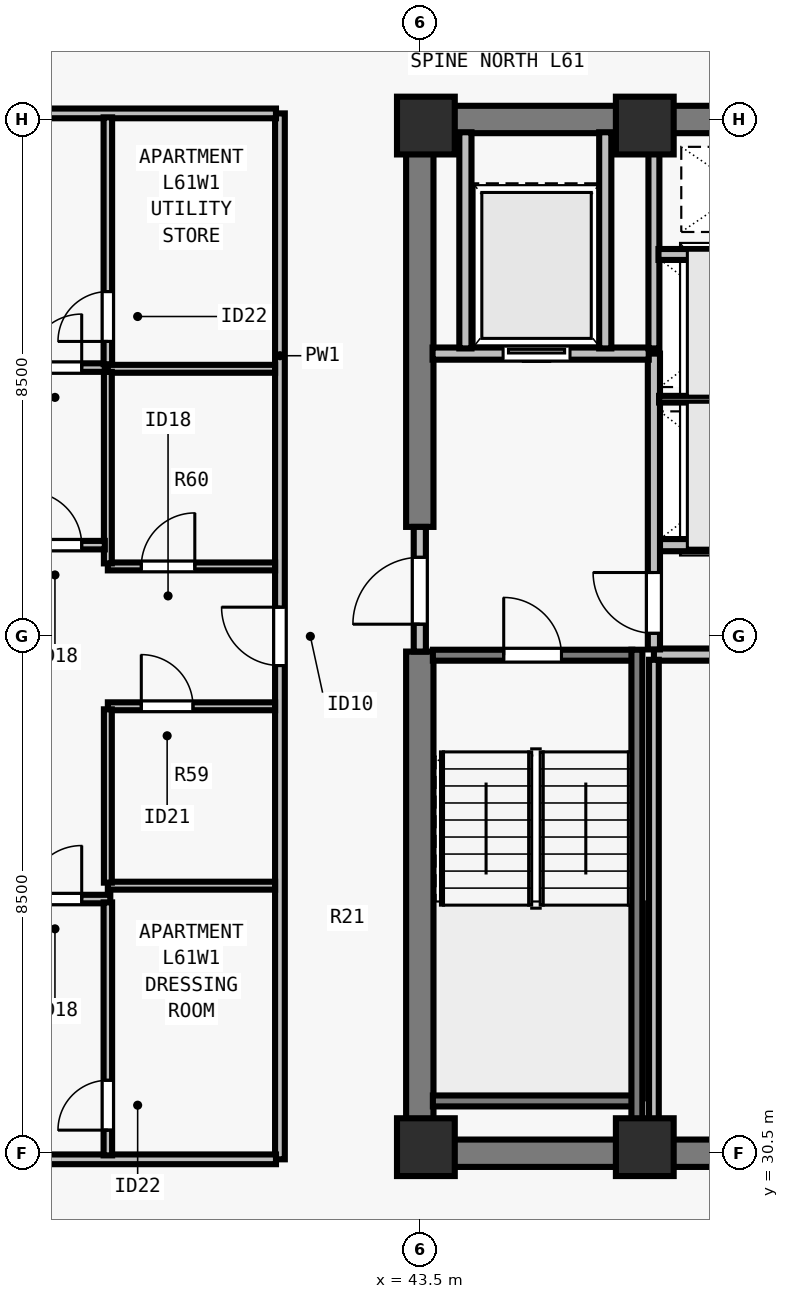
"""IFC4 building model, lengths in metres.
Left out: names, types, materials, properties, quantities, classifications, styles, units other than length and angle.
Written with IfcOpenShell. Run it as: python <this file> out.ifc"""

import sys

from ifc_helpers import new_model, si_unit, direction, frame, frame_2d, origin, origin_2d, place, context, subcontext, project, spatial, rectangle, extrude, element, fill, save


model = new_model("IFC4")
c1 = context("Model", 3, precision=1e-05, world=origin(), true_north=direction((0.0, 1.0)))
c2 = subcontext(c1, "Body", "Model", "MODEL_VIEW")
j1 = project(units=[si_unit("LENGTHUNIT", "METRE"), si_unit("PLANEANGLEUNIT", "RADIAN")], contexts=[c1])
p1 = place(None, origin())
s1 = spatial("IfcSite", under=j1, at=p1, CompositionType="ELEMENT")
p2 = place(p1, origin())
s2 = spatial("IfcBuilding", under=s1, at=p2, CompositionType="ELEMENT")
p3 = place(p2, frame((0.0, 0.0, 223.5)))
s3 = spatial("IfcBuildingStorey", under=s2, at=p3, CompositionType="ELEMENT", Elevation=223.5)
for number, where, z_axis, x_axis in (
    (1, (43.6, 30.6, 0.0), (0.0, 0.0, 1.0), (1.0, 0.0, 0.0)),
    (2, (47.2, 30.6, 0.0), (0.0, 0.0, 1.0), (1.0, 0.0, 0.0)),
    (3, (43.6, 47.4, 0.0), (0.0, 0.0, 1.0), (1.0, 0.0, 0.0)),
    (4, (47.2, 47.4, 0.0), (0.0, 0.0, 1.0), (1.0, 0.0, 0.0)),
):
    element("IfcColumn", number, at=place(p3, frame(where, z_axis=z_axis, x_axis=x_axis)), inside=s3, PredefinedType="COLUMN", context=c2, shape_type="SweptSolid", body=[
        extrude(rectangle(XDim=0.95, YDim=0.95, at=origin_2d()), origin(), (0.0, 0.0, 1.0), 3.5),
    ])
for number, where, z_axis, x_axis in (
    (5, (43.275, 30.5, 0.0), (0.0, 0.0, 1.0), (1.0, 0.0, 0.0)),
    (6, (43.275, 47.5, 0.0), (0.0, 0.0, 1.0), (1.0, 0.0, 0.0)),
):
    element("IfcWall", number, at=place(p3, frame(where, z_axis=z_axis, x_axis=x_axis)), inside=s3, PredefinedType="SHEAR", context=c2, shape_type="SweptSolid", body=[
        extrude(rectangle(XDim=17.45, YDim=0.45, at=frame_2d((8.725, 0.0))), origin(), (0.0, 0.0, 1.0), 3.29),
    ])
p4 = place(p3, frame((43.5, 30.715, 0.0), z_axis=(0.0, 0.0, 1.0), x_axis=(0.0, 1.0, 0.0)))
e7 = element("IfcWall", 7, at=p4, inside=s3, PredefinedType="SHEAR", context=c2, shape_type="SweptSolid", body=[
    extrude(rectangle(XDim=8.035, YDim=0.45, at=frame_2d((4.018, 0.0))), origin(), (0.0, 0.0, 1.0), 3.29),
])
p5 = place(p3, frame((43.5, 40.8, 0.0), z_axis=(0.0, 0.0, 1.0), x_axis=(0.0, 1.0, 0.0)))
e8 = element("IfcWall", 8, at=p5, inside=s3, PredefinedType="SHEAR", context=c2, shape_type="SweptSolid", body=[
    extrude(rectangle(XDim=6.485, YDim=0.45, at=frame_2d((3.242, 0.0))), origin(), (0.0, 0.0, 1.0), 3.29),
])
for number, where, z_axis, x_axis in (
    (9, (47.35, 38.7, 0.0), (0.0, 0.0, 1.0), (1.0, 0.0, 0.0)),
    (10, (47.35, 40.5, 0.0), (0.0, 0.0, 1.0), (1.0, 0.0, 0.0)),
):
    element("IfcWall", number, at=place(p3, frame(where, z_axis=z_axis, x_axis=x_axis)), inside=s3, PredefinedType="SOLIDWALL", context=c2, shape_type="SweptSolid", body=[
        extrude(rectangle(XDim=2.95, YDim=0.2, at=frame_2d((1.475, 0.0))), origin(), (0.0, 0.0, 1.0), 3.29),
    ])
p6 = place(p3, frame((43.5, 38.75, 0.0), z_axis=(0.0, 0.0, 1.0), x_axis=(0.0, 1.0, 0.0)))
e11 = element("IfcWall", 11, at=p6, inside=s3, PredefinedType="SOLIDWALL", context=c2, shape_type="SweptSolid", body=[
    extrude(rectangle(XDim=2.05, YDim=0.2, at=frame_2d((1.025, 0.0))), origin(), (0.0, 0.0, 1.0), 3.29),
])
p7 = place(p6, frame((0.45, 0.0, 0.0)))
e12 = element("IfcOpeningElement", 12, at=p7, cuts=e11, PredefinedType="OPENING", context=c2, shape_type="SweptSolid", body=[
    extrude(rectangle(XDim=1.1, YDim=2.15, at=frame_2d((0.55, 1.075))), frame((0.0, 0.11, 0.0), z_axis=(0.0, -1.0, 0.0), x_axis=(1.0, 0.0, 0.0)), (0.0, 0.0, 1.0), 0.22),
])
p8 = place(p3, frame((47.35, 38.785, 0.0), z_axis=(0.0, 0.0, 1.0), x_axis=(0.0, 1.0, 0.0)))
e13 = element("IfcWall", 13, at=p8, inside=s3, PredefinedType="SOLIDWALL", context=c2, shape_type="SweptSolid", body=[
    extrude(rectangle(XDim=4.865, YDim=0.2, at=frame_2d((2.433, 0.0))), origin(), (0.0, 0.0, 1.0), 3.29),
])
p9 = place(p8, frame((0.265, 0.0, 0.0)))
e14 = element("IfcOpeningElement", 14, at=p9, cuts=e13, PredefinedType="OPENING", context=c2, shape_type="SweptSolid", body=[
    extrude(rectangle(XDim=1.0, YDim=2.15, at=frame_2d((0.5, 1.075))), frame((0.0, 0.11, 0.0), z_axis=(0.0, -1.0, 0.0), x_axis=(1.0, 0.0, 0.0)), (0.0, 0.0, 1.0), 0.22),
])
p10 = place(p3, frame((43.71, 43.65, 0.0), z_axis=(0.0, 0.0, 1.0), x_axis=(1.0, 0.0, 0.0)))
e15 = element("IfcWall", 15, at=p10, inside=s3, PredefinedType="SOLIDWALL", context=c2, shape_type="SweptSolid", body=[
    extrude(rectangle(XDim=3.555, YDim=0.2, at=frame_2d((1.777, 0.0))), origin(), (0.0, 0.0, 1.0), 3.29),
])
p11 = place(p10, frame((1.16, 0.0, 0.0)))
e16 = element("IfcOpeningElement", 16, at=p11, cuts=e15, PredefinedType="OPENING", context=c2, shape_type="SweptSolid", body=[
    extrude(rectangle(XDim=1.1, YDim=2.2, at=frame_2d((0.55, 1.1))), frame((0.0, 0.11, 0.0), z_axis=(0.0, -1.0, 0.0), x_axis=(1.0, 0.0, 0.0)), (0.0, 0.0, 1.0), 0.22),
])
for number, where, z_axis, x_axis in (
    (17, (46.55, 43.735, 0.0), (0.0, 0.0, 1.0), (0.0, 1.0, 0.0)),
    (18, (44.25, 43.735, 0.0), (0.0, 0.0, 1.0), (0.0, 1.0, 0.0)),
):
    element("IfcWall", number, at=place(p3, frame(where, z_axis=z_axis, x_axis=x_axis)), inside=s3, PredefinedType="SOLIDWALL", context=c2, shape_type="SweptSolid", body=[
        extrude(rectangle(XDim=3.555, YDim=0.2, at=frame_2d((1.777, 0.0))), origin(), (0.0, 0.0, 1.0), 3.29),
    ])
p12 = place(p3, frame((47.35, 30.71, 0.0), z_axis=(0.0, 0.0, 1.0), x_axis=(0.0, 1.0, 0.0)))
e19 = element("IfcWall", 19, at=p12, inside=s3, PredefinedType="PARTITIONING", context=c2, shape_type="SweptSolid", body=[
    extrude(rectangle(XDim=7.905, YDim=0.16, at=frame_2d((3.953, 0.0))), origin(), (0.0, 0.0, 1.0), 3.29),
])
p13 = place(p3, frame((47.35, 43.735, 0.0), z_axis=(0.0, 0.0, 1.0), x_axis=(0.0, 1.0, 0.0)))
e20 = element("IfcWall", 20, at=p13, inside=s3, PredefinedType="SOLIDWALL", context=c2, shape_type="SweptSolid", body=[
    extrude(rectangle(XDim=3.555, YDim=0.18, at=frame_2d((1.777, 0.0))), origin(), (0.0, 0.0, 1.0), 3.29),
])
p14 = place(p3, frame((47.435, 42.9, 0.0), z_axis=(0.0, 0.0, 1.0), x_axis=(1.0, 0.0, 0.0)))
e21 = element("IfcWall", 21, at=p14, inside=s3, PredefinedType="PARTITIONING", context=c2, shape_type="SweptSolid", body=[
    extrude(rectangle(XDim=2.78, YDim=0.11, at=frame_2d((1.39, 0.0))), origin(), (0.0, 0.0, 1.0), 3.29),
])
p15 = place(p3, frame((47.425, 45.28, 0.0), z_axis=(0.0, 0.0, 1.0), x_axis=(1.0, 0.0, 0.0)))
e22 = element("IfcWall", 22, at=p15, inside=s3, PredefinedType="SOLIDWALL", context=c2, shape_type="SweptSolid", body=[
    extrude(rectangle(XDim=2.79, YDim=0.18, at=frame_2d((1.395, 0.0))), origin(), (0.0, 0.0, 1.0), 3.29),
])
p16 = place(p3, frame((41.2, 30.4, 0.0), z_axis=(0.0, 0.0, 1.0), x_axis=(0.0, 1.0, 0.0)))
e23 = element("IfcWall", 23, at=p16, inside=s3, PredefinedType="PARTITIONING", context=c2, shape_type="SweptSolid", body=[
    extrude(rectangle(XDim=17.2, YDim=0.16, at=frame_2d((8.6, 0.0))), origin(), (0.0, 0.0, 1.0), 3.29),
])
p17 = place(p16, frame((8.12, 0.0, 0.0)))
e24 = element("IfcOpeningElement", 24, at=p17, cuts=e23, PredefinedType="OPENING", context=c2, shape_type="SweptSolid", body=[
    extrude(rectangle(XDim=0.96, YDim=2.18, at=frame_2d((0.48, 1.09))), frame((0.0, 0.09, 0.0), z_axis=(0.0, -1.0, 0.0), x_axis=(1.0, 0.0, 0.0)), (0.0, 0.0, 1.0), 0.18),
])
for number, where, z_axis, x_axis in (
    (25, (29.805, 30.4, 0.0), (0.0, 0.0, 1.0), (1.0, 0.0, 0.0)),
    (26, (29.805, 47.6, 0.0), (0.0, 0.0, 1.0), (1.0, 0.0, 0.0)),
):
    element("IfcWall", number, at=place(p3, frame(where, z_axis=z_axis, x_axis=x_axis)), inside=s3, PredefinedType="PARTITIONING", context=c2, shape_type="SweptSolid", body=[
        extrude(rectangle(XDim=11.33, YDim=0.16, at=frame_2d((5.665, 0.0))), origin(), (0.0, 0.0, 1.0), 3.29),
    ])
p18 = place(p3, frame((38.37, 34.9, 0.0), z_axis=(0.0, 0.0, 1.0), x_axis=(1.0, 0.0, 0.0)))
e27 = element("IfcWall", 27, at=p18, inside=s3, PredefinedType="PLUMBINGWALL", context=c2, shape_type="SweptSolid", body=[
    extrude(rectangle(XDim=2.75, YDim=0.13, at=frame_2d((1.375, 0.0))), origin(), (0.0, 0.0, 1.0), 3.29),
])
p19 = place(p3, frame((38.37, 37.85, 0.0), z_axis=(0.0, 0.0, 1.0), x_axis=(1.0, 0.0, 0.0)))
e28 = element("IfcWall", 28, at=p19, inside=s3, PredefinedType="PLUMBINGWALL", context=c2, shape_type="SweptSolid", body=[
    extrude(rectangle(XDim=2.75, YDim=0.13, at=frame_2d((1.375, 0.0))), origin(), (0.0, 0.0, 1.0), 3.29),
])
p20 = place(p19, frame((0.55, 0.0, 0.0)))
e29 = element("IfcOpeningElement", 29, at=p20, cuts=e28, PredefinedType="OPENING", context=c2, shape_type="SweptSolid", body=[
    extrude(rectangle(XDim=0.85, YDim=2.08, at=frame_2d((0.425, 1.04))), frame((0.0, 0.075, 0.0), z_axis=(0.0, -1.0, 0.0), x_axis=(1.0, 0.0, 0.0)), (0.0, 0.0, 1.0), 0.15),
])
p21 = place(p3, frame((38.37, 34.95, 0.0), z_axis=(0.0, 0.0, 1.0), x_axis=(0.0, 1.0, 0.0)))
e30 = element("IfcWall", 30, at=p21, inside=s3, PredefinedType="PLUMBINGWALL", context=c2, shape_type="SweptSolid", body=[
    extrude(rectangle(XDim=2.85, YDim=0.13, at=frame_2d((1.425, 0.0))), origin(), (0.0, 0.0, 1.0), 3.29),
])
p22 = place(p3, frame((38.37, 43.4, 0.0), z_axis=(0.0, 0.0, 1.0), x_axis=(1.0, 0.0, 0.0)))
e31 = element("IfcWall", 31, at=p22, inside=s3, PredefinedType="PLUMBINGWALL", context=c2, shape_type="SweptSolid", body=[
    extrude(rectangle(XDim=2.75, YDim=0.13, at=frame_2d((1.375, 0.0))), origin(), (0.0, 0.0, 1.0), 2.958),
])
p23 = place(p3, frame((38.37, 40.15, 0.0), z_axis=(0.0, 0.0, 1.0), x_axis=(1.0, 0.0, 0.0)))
e32 = element("IfcWall", 32, at=p23, inside=s3, PredefinedType="PLUMBINGWALL", context=c2, shape_type="SweptSolid", body=[
    extrude(rectangle(XDim=2.75, YDim=0.13, at=frame_2d((1.375, 0.0))), origin(), (0.0, 0.0, 1.0), 3.29),
])
p24 = place(p23, frame((0.55, 0.0, 0.0)))
e33 = element("IfcOpeningElement", 33, at=p24, cuts=e32, PredefinedType="OPENING", context=c2, shape_type="SweptSolid", body=[
    extrude(rectangle(XDim=0.88, YDim=2.1, at=frame_2d((0.44, 1.05))), frame((0.0, 0.075, 0.0), z_axis=(0.0, -1.0, 0.0), x_axis=(1.0, 0.0, 0.0)), (0.0, 0.0, 1.0), 0.15),
])
p25 = place(p3, frame((38.37, 40.2, 0.0), z_axis=(0.0, 0.0, 1.0), x_axis=(0.0, 1.0, 0.0)))
e34 = element("IfcWall", 34, at=p25, inside=s3, PredefinedType="PLUMBINGWALL", context=c2, shape_type="SweptSolid", body=[
    extrude(rectangle(XDim=3.15, YDim=0.13, at=frame_2d((1.575, 0.0))), origin(), (0.0, 0.0, 1.0), 3.29),
])
p26 = place(p3, frame((29.88, 34.68, 0.0), z_axis=(0.0, 0.0, 1.0), x_axis=(1.0, 0.0, 0.0)))
e35 = element("IfcWall", 35, at=p26, inside=s3, PredefinedType="PARTITIONING", context=c2, shape_type="SweptSolid", body=[
    extrude(rectangle(XDim=8.53, YDim=0.14, at=frame_2d((4.265, 0.0))), origin(), (0.0, 0.0, 1.0), 2.958),
])
p27 = place(p26, frame((7.18, 0.0, 0.0)))
e36 = element("IfcOpeningElement", 36, at=p27, cuts=e35, PredefinedType="OPENING", context=c2, shape_type="SweptSolid", body=[
    extrude(rectangle(XDim=0.88, YDim=2.1, at=frame_2d((0.44, 1.05))), frame((0.0, 0.08, 0.0), z_axis=(0.0, -1.0, 0.0), x_axis=(1.0, 0.0, 0.0)), (0.0, 0.0, 1.0), 0.16),
])
p28 = place(p3, frame((38.37, 30.465, 0.0), z_axis=(0.0, 0.0, 1.0), x_axis=(0.0, 1.0, 0.0)))
e37 = element("IfcWall", 37, at=p28, inside=s3, PredefinedType="PARTITIONING", context=c2, shape_type="SweptSolid", body=[
    extrude(rectangle(XDim=4.16, YDim=0.14, at=frame_2d((2.08, 0.0))), origin(), (0.0, 0.0, 1.0), 3.29),
])
p29 = place(p28, frame((0.415, 0.0, 0.0)))
e38 = element("IfcOpeningElement", 38, at=p29, cuts=e37, PredefinedType="OPENING", context=c2, shape_type="SweptSolid", body=[
    extrude(rectangle(XDim=0.82, YDim=2.1, at=frame_2d((0.41, 1.05))), frame((0.0, 0.08, 0.0), z_axis=(0.0, -1.0, 0.0), x_axis=(1.0, 0.0, 0.0)), (0.0, 0.0, 1.0), 0.16),
])
p30 = place(p3, frame((29.88, 43.42, 0.0), z_axis=(0.0, 0.0, 1.0), x_axis=(1.0, 0.0, 0.0)))
e39 = element("IfcWall", 39, at=p30, inside=s3, PredefinedType="PARTITIONING", context=c2, shape_type="SweptSolid", body=[
    extrude(rectangle(XDim=8.44, YDim=0.14, at=frame_2d((4.22, 0.0))), origin(), (0.0, 0.0, 1.0), 3.29),
])
p31 = place(p30, frame((7.18, 0.0, 0.0)))
e40 = element("IfcOpeningElement", 40, at=p31, cuts=e39, PredefinedType="OPENING", context=c2, shape_type="SweptSolid", body=[
    extrude(rectangle(XDim=0.88, YDim=2.1, at=frame_2d((0.44, 1.05))), frame((0.0, 0.08, 0.0), z_axis=(0.0, -1.0, 0.0), x_axis=(1.0, 0.0, 0.0)), (0.0, 0.0, 1.0), 0.16),
])
p32 = place(p3, frame((38.37, 43.475, 0.0), z_axis=(0.0, 0.0, 1.0), x_axis=(0.0, 1.0, 0.0)))
e41 = element("IfcWall", 41, at=p32, inside=s3, PredefinedType="PARTITIONING", context=c2, shape_type="SweptSolid", body=[
    extrude(rectangle(XDim=4.06, YDim=0.14, at=frame_2d((2.03, 0.0))), origin(), (0.0, 0.0, 1.0), 3.29),
])
p33 = place(p32, frame((0.375, 0.0, 0.0)))
e42 = element("IfcOpeningElement", 42, at=p33, cuts=e41, PredefinedType="OPENING", context=c2, shape_type="SweptSolid", body=[
    extrude(rectangle(XDim=0.82, YDim=2.1, at=frame_2d((0.41, 1.05))), frame((0.0, 0.08, 0.0), z_axis=(0.0, -1.0, 0.0), x_axis=(1.0, 0.0, 0.0)), (0.0, 0.0, 1.0), 0.16),
])
p34 = place(p3, frame((29.88, 40.5, 0.0), z_axis=(0.0, 0.0, 1.0), x_axis=(1.0, 0.0, 0.0)))
e43 = element("IfcWall", 43, at=p34, inside=s3, PredefinedType="PARTITIONING", context=c2, shape_type="SweptSolid", body=[
    extrude(rectangle(XDim=8.44, YDim=0.14, at=frame_2d((4.22, 0.0))), origin(), (0.0, 0.0, 1.0), 2.958),
])
p35 = place(p34, frame((7.18, 0.0, 0.0)))
e44 = element("IfcOpeningElement", 44, at=p35, cuts=e43, PredefinedType="OPENING", context=c2, shape_type="SweptSolid", body=[
    extrude(rectangle(XDim=0.88, YDim=2.1, at=frame_2d((0.44, 1.05))), frame((0.0, 0.08, 0.0), z_axis=(0.0, -1.0, 0.0), x_axis=(1.0, 0.0, 0.0)), (0.0, 0.0, 1.0), 0.16),
])
p36 = place(p3, frame((43.715, 38.69, 0.0), z_axis=(0.0, 0.0, 1.0), x_axis=(1.0, 0.0, 0.0)))
e45 = element("IfcWall", 45, at=p36, inside=s3, PredefinedType="SOLIDWALL", context=c2, shape_type="SweptSolid", body=[
    extrude(rectangle(XDim=3.28, YDim=0.18, at=frame_2d((1.64, 0.0))), origin(), (0.0, 0.0, 1.0), 3.29),
])
p37 = place(p36, frame((1.165, 0.0, 0.0)))
e46 = element("IfcOpeningElement", 46, at=p37, cuts=e45, PredefinedType="OPENING", context=c2, shape_type="SweptSolid", body=[
    extrude(rectangle(XDim=0.95, YDim=2.15, at=frame_2d((0.475, 1.075))), frame((0.0, 0.1, 0.0), z_axis=(0.0, -1.0, 0.0), x_axis=(1.0, 0.0, 0.0)), (0.0, 0.0, 1.0), 0.2),
])
p38 = place(p3, frame((43.715, 31.36, 0.0), z_axis=(0.0, 0.0, 1.0), x_axis=(1.0, 0.0, 0.0)))
e47 = element("IfcWall", 47, at=p38, inside=s3, PredefinedType="SOLIDWALL", context=c2, shape_type="SweptSolid", body=[
    extrude(rectangle(XDim=3.28, YDim=0.18, at=frame_2d((1.64, 0.0))), origin(), (0.0, 0.0, 1.0), 3.29),
])
p39 = place(p3, frame((47.07, 38.78, 0.0), z_axis=(0.0, 0.0, 1.0), x_axis=(0.0, -1.0, 0.0)))
e48 = element("IfcWall", 48, at=p39, inside=s3, PredefinedType="SOLIDWALL", context=c2, shape_type="SweptSolid", body=[
    extrude(rectangle(XDim=8.067, YDim=0.18, at=frame_2d((4.034, 0.0))), origin(), (0.0, 0.0, 1.0), 3.29),
])
p40 = place(p7, origin())
e49 = element("IfcDoor", 49, at=p40, inside=s3, OperationType="SINGLE_SWING_LEFT", PredefinedType="DOOR", context=c2, shape_type="SweptSolid", body=[
    extrude(rectangle(XDim=1.1, YDim=2.15, at=frame_2d((0.55, 1.075))), frame((0.0, 0.025, 0.0), z_axis=(0.0, -1.0, 0.0), x_axis=(1.0, 0.0, 0.0)), (0.0, 0.0, 1.0), 0.05),
])
fill(e12, e49)
p41 = place(p9, origin())
e50 = element("IfcDoor", 50, at=p41, inside=s3, OperationType="SINGLE_SWING_RIGHT", PredefinedType="DOOR", context=c2, shape_type="SweptSolid", body=[
    extrude(rectangle(XDim=1.0, YDim=2.15, at=frame_2d((0.5, 1.075))), frame((0.0, 0.025, 0.0), z_axis=(0.0, -1.0, 0.0), x_axis=(1.0, 0.0, 0.0)), (0.0, 0.0, 1.0), 0.05),
])
fill(e14, e50)
p42 = place(p11, origin())
e51 = element("IfcDoor", 51, at=p42, inside=s3, OperationType="SLIDING_TO_LEFT", PredefinedType="DOOR", context=c2, shape_type="SweptSolid", body=[
    extrude(rectangle(XDim=1.1, YDim=2.2, at=frame_2d((0.55, 1.1))), frame((0.0, 0.025, 0.0), z_axis=(0.0, -1.0, 0.0), x_axis=(1.0, 0.0, 0.0)), (0.0, 0.0, 1.0), 0.05),
])
fill(e16, e51)
p43 = place(p20, origin())
e52 = element("IfcDoor", 52, at=p43, inside=s3, OperationType="SINGLE_SWING_LEFT", PredefinedType="DOOR", context=c2, shape_type="SweptSolid", body=[
    extrude(rectangle(XDim=0.85, YDim=2.08, at=frame_2d((0.425, 1.04))), frame((0.0, 0.025, 0.0), z_axis=(0.0, -1.0, 0.0), x_axis=(1.0, 0.0, 0.0)), (0.0, 0.0, 1.0), 0.05),
])
fill(e29, e52)
p44 = place(p24, origin())
e53 = element("IfcDoor", 53, at=p44, inside=s3, OperationType="SINGLE_SWING_RIGHT", PredefinedType="DOOR", context=c2, shape_type="SweptSolid", body=[
    extrude(rectangle(XDim=0.88, YDim=2.1, at=frame_2d((0.44, 1.05))), frame((0.0, 0.025, 0.0), z_axis=(0.0, -1.0, 0.0), x_axis=(1.0, 0.0, 0.0)), (0.0, 0.0, 1.0), 0.05),
])
fill(e33, e53)
p45 = place(p29, origin())
e54 = element("IfcDoor", 54, at=p45, inside=s3, OperationType="SINGLE_SWING_LEFT", PredefinedType="DOOR", context=c2, shape_type="SweptSolid", body=[
    extrude(rectangle(XDim=0.82, YDim=2.1, at=frame_2d((0.41, 1.05))), frame((0.0, 0.025, 0.0), z_axis=(0.0, -1.0, 0.0), x_axis=(1.0, 0.0, 0.0)), (0.0, 0.0, 1.0), 0.05),
])
fill(e38, e54)
p46 = place(p27, origin())
e55 = element("IfcDoor", 55, at=p46, inside=s3, OperationType="SINGLE_SWING_RIGHT", PredefinedType="DOOR", context=c2, shape_type="SweptSolid", body=[
    extrude(rectangle(XDim=0.88, YDim=2.1, at=frame_2d((0.44, 1.05))), frame((0.0, 0.025, 0.0), z_axis=(0.0, -1.0, 0.0), x_axis=(1.0, 0.0, 0.0)), (0.0, 0.0, 1.0), 0.05),
])
fill(e36, e55)
p47 = place(p33, origin())
e56 = element("IfcDoor", 56, at=p47, inside=s3, OperationType="SINGLE_SWING_LEFT", PredefinedType="DOOR", context=c2, shape_type="SweptSolid", body=[
    extrude(rectangle(XDim=0.82, YDim=2.1, at=frame_2d((0.41, 1.05))), frame((0.0, 0.025, 0.0), z_axis=(0.0, -1.0, 0.0), x_axis=(1.0, 0.0, 0.0)), (0.0, 0.0, 1.0), 0.05),
])
fill(e42, e56)
p48 = place(p31, origin())
e57 = element("IfcDoor", 57, at=p48, inside=s3, OperationType="SINGLE_SWING_RIGHT", PredefinedType="DOOR", context=c2, shape_type="SweptSolid", body=[
    extrude(rectangle(XDim=0.88, YDim=2.1, at=frame_2d((0.44, 1.05))), frame((0.0, 0.025, 0.0), z_axis=(0.0, -1.0, 0.0), x_axis=(1.0, 0.0, 0.0)), (0.0, 0.0, 1.0), 0.05),
])
fill(e40, e57)
p49 = place(p35, origin())
e58 = element("IfcDoor", 58, at=p49, inside=s3, OperationType="SINGLE_SWING_LEFT", PredefinedType="DOOR", context=c2, shape_type="SweptSolid", body=[
    extrude(rectangle(XDim=0.88, YDim=2.1, at=frame_2d((0.44, 1.05))), frame((0.0, 0.025, 0.0), z_axis=(0.0, -1.0, 0.0), x_axis=(1.0, 0.0, 0.0)), (0.0, 0.0, 1.0), 0.05),
])
fill(e44, e58)
p50 = place(p17, origin())
e59 = element("IfcDoor", 59, at=p50, inside=s3, OperationType="SINGLE_SWING_RIGHT", PredefinedType="DOOR", context=c2, shape_type="SweptSolid", body=[
    extrude(rectangle(XDim=0.96, YDim=2.18, at=frame_2d((0.48, 1.09))), frame((0.0, 0.025, 0.0), z_axis=(0.0, -1.0, 0.0), x_axis=(1.0, 0.0, 0.0)), (0.0, 0.0, 1.0), 0.05),
])
fill(e24, e59)
p51 = place(p37, origin())
e60 = element("IfcDoor", 60, at=p51, inside=s3, OperationType="SINGLE_SWING_LEFT", PredefinedType="DOOR", context=c2, shape_type="SweptSolid", body=[
    extrude(rectangle(XDim=0.95, YDim=2.15, at=frame_2d((0.475, 1.075))), frame((0.0, 0.025, 0.0), z_axis=(0.0, -1.0, 0.0), x_axis=(1.0, 0.0, 0.0)), (0.0, 0.0, 1.0), 0.05),
])
fill(e46, e60)
save(model, sys.argv[1])
